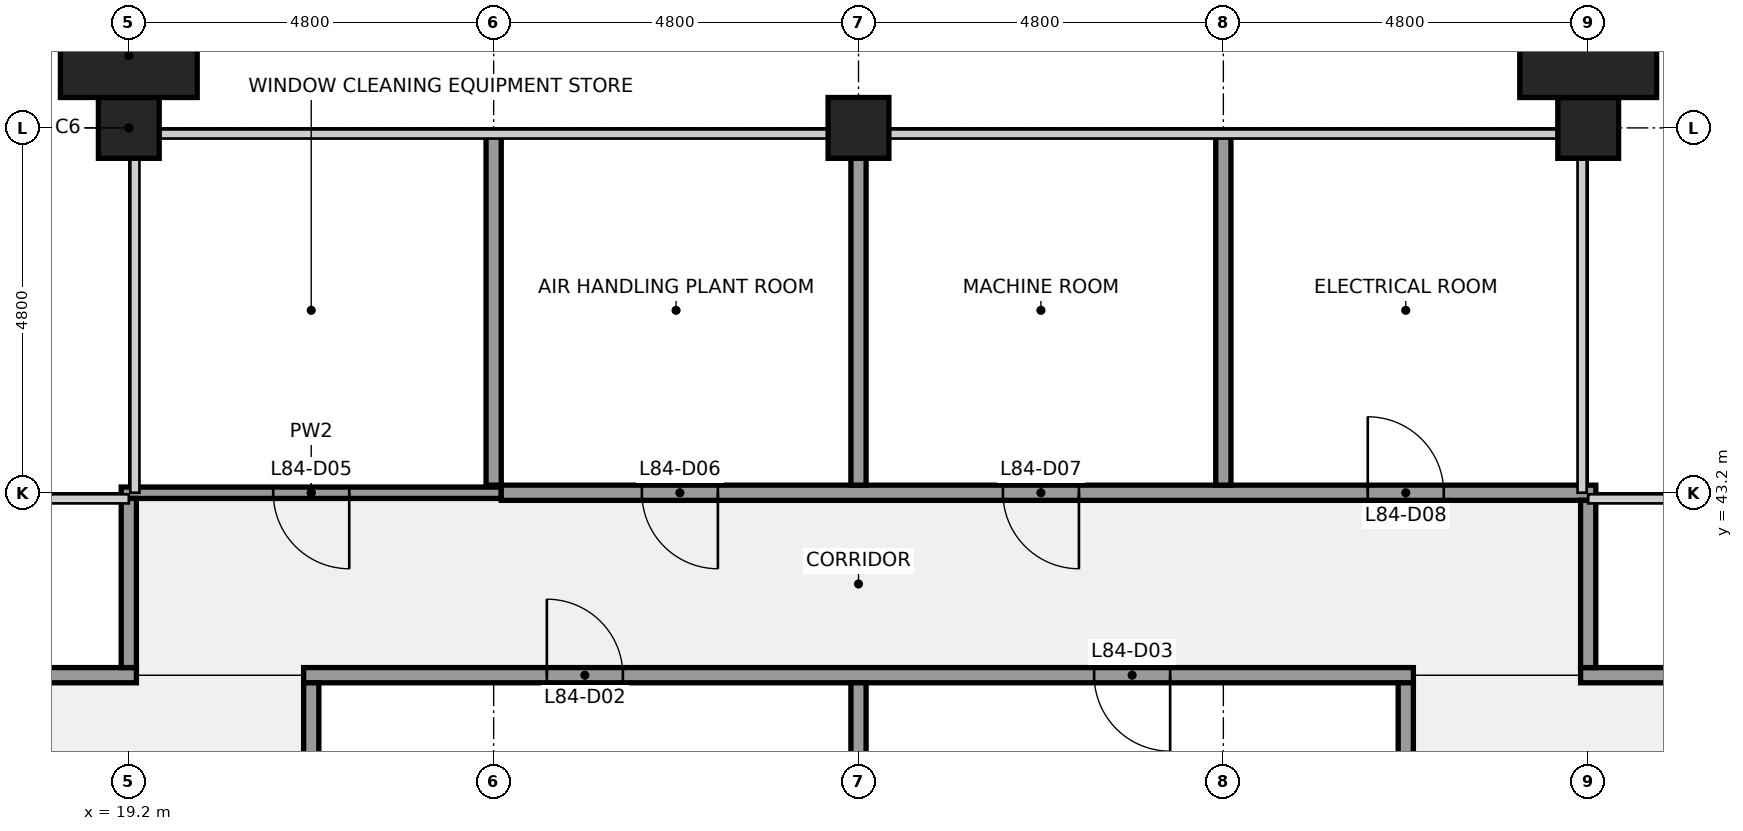
"""IFC4 building model, lengths in metres.
Left out: names, types, materials, properties, quantities, classifications, styles, units other than length and angle.
Written with IfcOpenShell. Run it as: python <this file> out.ifc"""

import sys

from ifc_helpers import new_model, si_unit, direction, frame, frame_2d, origin, origin_2d, place, context, subcontext, project, spatial, rectangle, extrude, element, fill, save


model = new_model("IFC4")
c1 = context("Model", 3, precision=1e-05, world=origin(), true_north=direction((0.0, 1.0)))
c2 = subcontext(c1, "Body", "Model", "MODEL_VIEW")
j1 = project(units=[si_unit("LENGTHUNIT", "METRE"), si_unit("PLANEANGLEUNIT", "RADIAN")], contexts=[c1])
p1 = place(None, origin())
s1 = spatial("IfcSite", under=j1, at=p1, CompositionType="ELEMENT")
p2 = place(p1, origin())
s2 = spatial("IfcBuilding", under=s1, at=p2, CompositionType="ELEMENT")
p3 = place(p2, frame((0.0, 0.0, 374.3)))
s3 = spatial("IfcBuildingStorey", under=s2, at=p3, CompositionType="ELEMENT", Elevation=374.3)
for number, where, z_axis, x_axis in (
    (1, (19.2, 48.0, 0.0), (0.0, 0.0, 1.0), (1.0, 0.0, 0.0)),
    (2, (28.8, 48.0, 0.0), (0.0, 0.0, 1.0), (1.0, 0.0, 0.0)),
    (3, (38.4, 48.0, 0.0), (0.0, 0.0, 1.0), (1.0, 0.0, 0.0)),
):
    element("IfcColumn", number, at=place(p3, frame(where, z_axis=z_axis, x_axis=x_axis)), inside=s3, PredefinedType="COLUMN", context=c2, shape_type="SweptSolid", body=[
        extrude(rectangle(XDim=0.8, YDim=0.8, at=origin_2d()), origin(), (0.0, 0.0, 1.0), 4.0),
    ])
p4 = place(p3, frame((14.5, 40.8, 0.0), z_axis=(0.0, 0.0, 1.0), x_axis=(1.0, 0.0, 0.0)))
e4 = element("IfcWall", 4, at=p4, inside=s3, PredefinedType="PARTITIONING", context=c2, shape_type="SweptSolid", body=[
    extrude(rectangle(XDim=4.8, YDim=0.2, at=frame_2d((2.4, 0.0))), origin(), (0.0, 0.0, 1.0), 2.9),
])
p5 = place(p4, frame((1.85, 0.0, 0.0)))
e5 = element("IfcOpeningElement", 5, at=p5, cuts=e4, PredefinedType="OPENING", context=c2, shape_type="SweptSolid", body=[
    extrude(rectangle(XDim=1.0, YDim=2.1, at=frame_2d((0.5, 1.05))), frame((0.0, 0.11, 0.0), z_axis=(0.0, -1.0, 0.0), x_axis=(1.0, 0.0, 0.0)), (0.0, 0.0, 1.0), 0.22),
])
p6 = place(p3, frame((21.5, 40.8, 0.0), z_axis=(0.0, 0.0, 1.0), x_axis=(1.0, 0.0, 0.0)))
e6 = element("IfcWall", 6, at=p6, inside=s3, PredefinedType="PARTITIONING", context=c2, shape_type="SweptSolid", body=[
    extrude(rectangle(XDim=14.6, YDim=0.2, at=frame_2d((7.3, 0.0))), origin(), (0.0, 0.0, 1.0), 2.9),
])
p7 = place(p6, frame((3.2, 0.0, 0.0)))
e7 = element("IfcOpeningElement", 7, at=p7, cuts=e6, PredefinedType="OPENING", context=c2, shape_type="SweptSolid", body=[
    extrude(rectangle(XDim=1.0, YDim=2.1, at=frame_2d((0.5, 1.05))), frame((0.0, 0.11, 0.0), z_axis=(0.0, -1.0, 0.0), x_axis=(1.0, 0.0, 0.0)), (0.0, 0.0, 1.0), 0.22),
])
p8 = place(p6, frame((10.4, 0.0, 0.0)))
e8 = element("IfcOpeningElement", 8, at=p8, cuts=e6, PredefinedType="OPENING", context=c2, shape_type="SweptSolid", body=[
    extrude(rectangle(XDim=1.0, YDim=2.1, at=frame_2d((0.5, 1.05))), frame((0.0, 0.11, 0.0), z_axis=(0.0, -1.0, 0.0), x_axis=(1.0, 0.0, 0.0)), (0.0, 0.0, 1.0), 0.22),
])
p9 = place(p3, frame((38.3, 40.8, 0.0), z_axis=(0.0, 0.0, 1.0), x_axis=(1.0, 0.0, 0.0)))
e9 = element("IfcWall", 9, at=p9, inside=s3, PredefinedType="PARTITIONING", context=c2, shape_type="SweptSolid", body=[
    extrude(rectangle(XDim=4.8, YDim=0.2, at=frame_2d((2.4, 0.0))), origin(), (0.0, 0.0, 1.0), 2.9),
])
p10 = place(p9, frame((1.95, 0.0, 0.0)))
e10 = element("IfcOpeningElement", 10, at=p10, cuts=e9, PredefinedType="OPENING", context=c2, shape_type="SweptSolid", body=[
    extrude(rectangle(XDim=1.0, YDim=2.1, at=frame_2d((0.5, 1.05))), frame((0.0, 0.11, 0.0), z_axis=(0.0, -1.0, 0.0), x_axis=(1.0, 0.0, 0.0)), (0.0, 0.0, 1.0), 0.22),
])
p11 = place(p3, frame((19.1, 43.2, 0.0), z_axis=(0.0, 0.0, 1.0), x_axis=(1.0, 0.0, 0.0)))
e11 = element("IfcWall", 11, at=p11, inside=s3, PredefinedType="PARTITIONING", context=c2, shape_type="SweptSolid", body=[
    extrude(rectangle(XDim=5.0, YDim=0.15, at=frame_2d((2.5, 0.0))), origin(), (0.0, 0.0, 1.0), 2.9),
])
p12 = place(p11, frame((2.0, 0.0, 0.0)))
e12 = element("IfcOpeningElement", 12, at=p12, cuts=e11, PredefinedType="OPENING", context=c2, shape_type="SweptSolid", body=[
    extrude(rectangle(XDim=1.0, YDim=2.1, at=frame_2d((0.5, 1.05))), frame((0.0, 0.085, 0.0), z_axis=(0.0, -1.0, 0.0), x_axis=(1.0, 0.0, 0.0)), (0.0, 0.0, 1.0), 0.17),
])
p13 = place(p3, frame((24.1, 43.2, 0.0), z_axis=(0.0, 0.0, 1.0), x_axis=(1.0, 0.0, 0.0)))
e13 = element("IfcWall", 13, at=p13, inside=s3, PredefinedType="PARTITIONING", context=c2, shape_type="SweptSolid", body=[
    extrude(rectangle(XDim=14.4, YDim=0.2, at=frame_2d((7.2, 0.0))), origin(), (0.0, 0.0, 1.0), 2.9),
])
p14 = place(p13, frame((1.85, 0.0, 0.0)))
e14 = element("IfcOpeningElement", 14, at=p14, cuts=e13, PredefinedType="OPENING", context=c2, shape_type="SweptSolid", body=[
    extrude(rectangle(XDim=1.0, YDim=2.1, at=frame_2d((0.5, 1.05))), frame((0.0, 0.11, 0.0), z_axis=(0.0, -1.0, 0.0), x_axis=(1.0, 0.0, 0.0)), (0.0, 0.0, 1.0), 0.22),
])
p15 = place(p13, frame((6.6, 0.0, 0.0)))
e15 = element("IfcOpeningElement", 15, at=p15, cuts=e13, PredefinedType="OPENING", context=c2, shape_type="SweptSolid", body=[
    extrude(rectangle(XDim=1.0, YDim=2.1, at=frame_2d((0.5, 1.05))), frame((0.0, 0.11, 0.0), z_axis=(0.0, -1.0, 0.0), x_axis=(1.0, 0.0, 0.0)), (0.0, 0.0, 1.0), 0.22),
])
p16 = place(p13, frame((11.4, 0.0, 0.0)))
e16 = element("IfcOpeningElement", 16, at=p16, cuts=e13, PredefinedType="OPENING", context=c2, shape_type="SweptSolid", body=[
    extrude(rectangle(XDim=1.0, YDim=2.1, at=frame_2d((0.5, 1.05))), frame((0.0, 0.11, 0.0), z_axis=(0.0, -1.0, 0.0), x_axis=(1.0, 0.0, 0.0)), (0.0, 0.0, 1.0), 0.22),
])
p17 = place(p3, frame((19.2, 40.9, 0.0), z_axis=(0.0, 0.0, 1.0), x_axis=(0.0, 1.0, 0.0)))
e17 = element("IfcWall", 17, at=p17, inside=s3, PredefinedType="PARTITIONING", context=c2, shape_type="SweptSolid", body=[
    extrude(rectangle(XDim=2.225, YDim=0.2, at=frame_2d((1.113, 0.0))), origin(), (0.0, 0.0, 1.0), 2.9),
])
for number, where, z_axis, x_axis in (
    (18, (21.6, 36.1, 0.0), (0.0, 0.0, 1.0), (0.0, 1.0, 0.0)),
    (19, (24.0, 43.3, 0.0), (0.0, 0.0, 1.0), (0.0, 1.0, 0.0)),
    (20, (28.8, 36.1, 0.0), (0.0, 0.0, 1.0), (0.0, 1.0, 0.0)),
):
    element("IfcWall", number, at=place(p3, frame(where, z_axis=z_axis, x_axis=x_axis)), inside=s3, PredefinedType="PARTITIONING", context=c2, shape_type="SweptSolid", body=[
        extrude(rectangle(XDim=4.6, YDim=0.2, at=frame_2d((2.3, 0.0))), origin(), (0.0, 0.0, 1.0), 2.9),
    ])
p18 = place(p3, frame((28.8, 43.3, 0.0), z_axis=(0.0, 0.0, 1.0), x_axis=(0.0, 1.0, 0.0)))
e21 = element("IfcWall", 21, at=p18, inside=s3, PredefinedType="PARTITIONING", context=c2, shape_type="SweptSolid", body=[
    extrude(rectangle(XDim=4.3, YDim=0.2, at=frame_2d((2.15, 0.0))), origin(), (0.0, 0.0, 1.0), 2.9),
])
for number, where, z_axis, x_axis in (
    (22, (33.6, 43.3, 0.0), (0.0, 0.0, 1.0), (0.0, 1.0, 0.0)),
    (23, (36.0, 36.1, 0.0), (0.0, 0.0, 1.0), (0.0, 1.0, 0.0)),
):
    element("IfcWall", number, at=place(p3, frame(where, z_axis=z_axis, x_axis=x_axis)), inside=s3, PredefinedType="PARTITIONING", context=c2, shape_type="SweptSolid", body=[
        extrude(rectangle(XDim=4.6, YDim=0.2, at=frame_2d((2.3, 0.0))), origin(), (0.0, 0.0, 1.0), 2.9),
    ])
p19 = place(p3, frame((38.4, 40.9, 0.0), z_axis=(0.0, 0.0, 1.0), x_axis=(0.0, 1.0, 0.0)))
e24 = element("IfcWall", 24, at=p19, inside=s3, PredefinedType="PARTITIONING", context=c2, shape_type="SweptSolid", body=[
    extrude(rectangle(XDim=2.2, YDim=0.2, at=frame_2d((1.1, 0.0))), origin(), (0.0, 0.0, 1.0), 2.9),
])
for number, where, z_axis, x_axis in (
    (25, (19.2, 48.95, 0.0), (0.0, 0.0, 1.0), (1.0, 0.0, 0.0)),
    (26, (38.4, 48.95, 0.0), (0.0, 0.0, 1.0), (1.0, 0.0, 0.0)),
):
    element("IfcColumn", number, at=place(p3, frame(where, z_axis=z_axis, x_axis=x_axis)), inside=s3, PredefinedType="PILASTER", context=c2, shape_type="SweptSolid", body=[
        extrude(rectangle(XDim=1.8, YDim=1.1, at=origin_2d()), origin(), (0.0, 0.0, 1.0), 4.0),
    ])
p20 = place(p7, origin())
e27 = element("IfcDoor", 27, at=p20, inside=s3, OperationType="SINGLE_SWING_LEFT", PredefinedType="DOOR", context=c2, shape_type="SweptSolid", body=[
    extrude(rectangle(XDim=1.0, YDim=2.1, at=frame_2d((0.5, 1.05))), frame((0.0, 0.025, 0.0), z_axis=(0.0, -1.0, 0.0), x_axis=(1.0, 0.0, 0.0)), (0.0, 0.0, 1.0), 0.05),
])
fill(e7, e27)
p21 = place(p8, origin())
e28 = element("IfcDoor", 28, at=p21, inside=s3, OperationType="SINGLE_SWING_RIGHT", PredefinedType="DOOR", context=c2, shape_type="SweptSolid", body=[
    extrude(rectangle(XDim=1.0, YDim=2.1, at=frame_2d((0.5, 1.05))), frame((0.0, 0.025, 0.0), z_axis=(0.0, -1.0, 0.0), x_axis=(1.0, 0.0, 0.0)), (0.0, 0.0, 1.0), 0.05),
])
fill(e8, e28)
p22 = place(p12, origin())
e29 = element("IfcDoor", 29, at=p22, inside=s3, OperationType="SINGLE_SWING_RIGHT", PredefinedType="DOOR", context=c2, shape_type="SweptSolid", body=[
    extrude(rectangle(XDim=1.0, YDim=2.1, at=frame_2d((0.5, 1.05))), frame((0.0, 0.025, 0.0), z_axis=(0.0, -1.0, 0.0), x_axis=(1.0, 0.0, 0.0)), (0.0, 0.0, 1.0), 0.05),
])
fill(e12, e29)
p23 = place(p14, origin())
e30 = element("IfcDoor", 30, at=p23, inside=s3, OperationType="SINGLE_SWING_RIGHT", PredefinedType="DOOR", context=c2, shape_type="SweptSolid", body=[
    extrude(rectangle(XDim=1.0, YDim=2.1, at=frame_2d((0.5, 1.05))), frame((0.0, 0.025, 0.0), z_axis=(0.0, -1.0, 0.0), x_axis=(1.0, 0.0, 0.0)), (0.0, 0.0, 1.0), 0.05),
])
fill(e14, e30)
p24 = place(p15, origin())
e31 = element("IfcDoor", 31, at=p24, inside=s3, OperationType="SINGLE_SWING_RIGHT", PredefinedType="DOOR", context=c2, shape_type="SweptSolid", body=[
    extrude(rectangle(XDim=1.0, YDim=2.1, at=frame_2d((0.5, 1.05))), frame((0.0, 0.025, 0.0), z_axis=(0.0, -1.0, 0.0), x_axis=(1.0, 0.0, 0.0)), (0.0, 0.0, 1.0), 0.05),
])
fill(e15, e31)
p25 = place(p16, origin())
e32 = element("IfcDoor", 32, at=p25, inside=s3, OperationType="SINGLE_SWING_LEFT", PredefinedType="DOOR", context=c2, shape_type="SweptSolid", body=[
    extrude(rectangle(XDim=1.0, YDim=2.1, at=frame_2d((0.5, 1.05))), frame((0.0, 0.025, 0.0), z_axis=(0.0, -1.0, 0.0), x_axis=(1.0, 0.0, 0.0)), (0.0, 0.0, 1.0), 0.05),
])
fill(e16, e32)
save(model, sys.argv[1])
